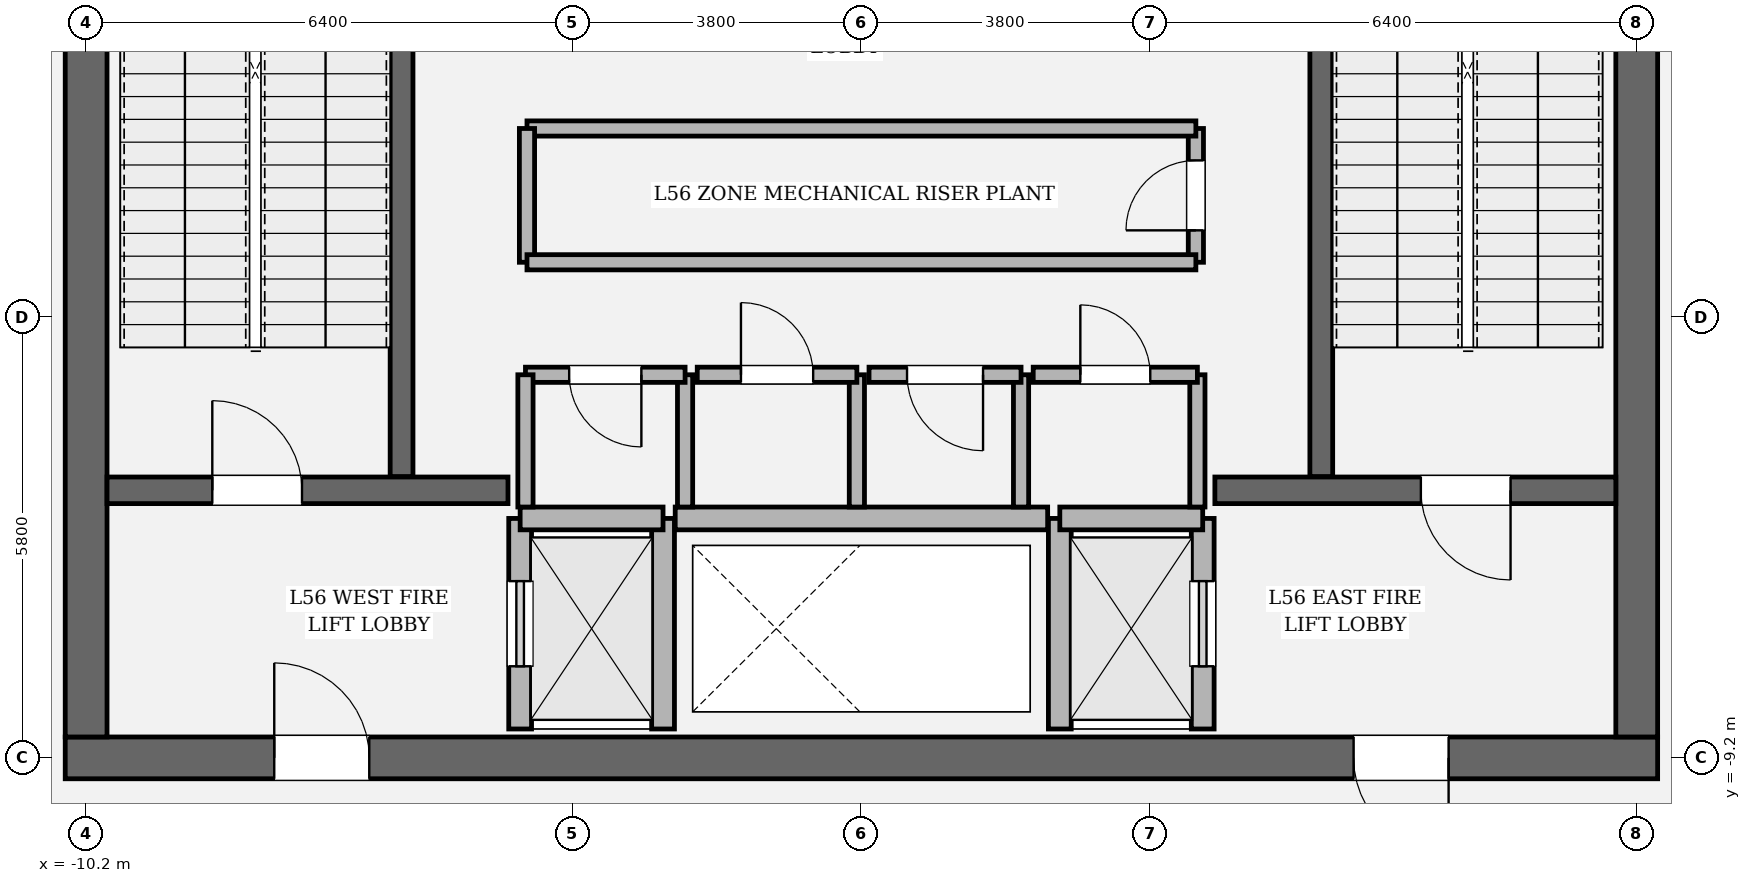
"""IFC4 building model, lengths in metres.
Left out: names, types, materials, properties, quantities, classifications, styles, units other than length and angle.
Written with IfcOpenShell. Run it as: python <this file> out.ifc"""

import sys

from ifc_helpers import new_model, si_unit, direction, frame, frame_2d, origin, place, context, subcontext, project, spatial, rectangle, extrude, element, fill, save


model = new_model("IFC4")
c1 = context("Model", 3, precision=1e-05, world=origin(), true_north=direction((0.0, 1.0)))
c2 = subcontext(c1, "Body", "Model", "MODEL_VIEW")
j1 = project(units=[si_unit("LENGTHUNIT", "METRE"), si_unit("PLANEANGLEUNIT", "RADIAN")], contexts=[c1])
p1 = place(None, origin())
s1 = spatial("IfcSite", under=j1, at=p1, CompositionType="ELEMENT")
p2 = place(p1, origin())
s2 = spatial("IfcBuilding", under=s1, at=p2, CompositionType="ELEMENT")
p3 = place(p2, frame((0.0, 0.0, 237.0)))
s3 = spatial("IfcBuildingStorey", under=s2, at=p3, CompositionType="ELEMENT", Elevation=237.0)
p4 = place(p3, frame((10.475, -9.2, 0.0), z_axis=(0.0, 0.0, 1.0), x_axis=(-1.0, 0.0, 0.0)))
e1 = element("IfcWall", 1, at=p4, inside=s3, PredefinedType="SHEAR", context=c2, shape_type="SweptSolid", body=[
    extrude(rectangle(XDim=20.95, YDim=0.55, at=frame_2d((10.475, 0.0))), origin(), (0.0, 0.0, 1.0), 4.8),
])
p5 = place(p4, frame((2.75, 0.0, 0.0)))
e2 = element("IfcOpeningElement", 2, at=p5, cuts=e1, PredefinedType="OPENING", context=c2, shape_type="SweptSolid", body=[
    extrude(rectangle(XDim=1.25, YDim=2.25, at=frame_2d((0.625, 1.125))), frame((0.0, 0.285, 0.0), z_axis=(0.0, -1.0, 0.0), x_axis=(1.0, 0.0, 0.0)), (0.0, 0.0, 1.0), 0.57),
])
p6 = place(p4, frame((16.95, 0.0, 0.0)))
e3 = element("IfcOpeningElement", 3, at=p6, cuts=e1, PredefinedType="OPENING", context=c2, shape_type="SweptSolid", body=[
    extrude(rectangle(XDim=1.25, YDim=2.25, at=frame_2d((0.625, 1.125))), frame((0.0, 0.285, 0.0), z_axis=(0.0, -1.0, 0.0), x_axis=(1.0, 0.0, 0.0)), (0.0, 0.0, 1.0), 0.57),
])
p7 = place(p3, frame((-10.2, -8.925, 0.0), z_axis=(0.0, 0.0, 1.0), x_axis=(0.0, 1.0, 0.0)))
e4 = element("IfcWall", 4, at=p7, inside=s3, PredefinedType="SHEAR", context=c2, shape_type="SweptSolid", body=[
    extrude(rectangle(XDim=17.85, YDim=0.55, at=frame_2d((8.925, 0.0))), origin(), (0.0, 0.0, 1.0), 4.8),
])
p8 = place(p7, frame((12.715, 0.0, 0.0)))
e5 = element("IfcOpeningElement", 5, at=p8, cuts=e4, PredefinedType="OPENING", context=c2, shape_type="SweptSolid", body=[
    extrude(rectangle(XDim=1.18, YDim=2.2, at=frame_2d((0.59, 1.1))), frame((0.0, 0.285, 0.0), z_axis=(0.0, -1.0, 0.0), x_axis=(1.0, 0.0, 0.0)), (0.0, 0.0, 1.0), 0.57),
])
p9 = place(p3, frame((10.2, 8.925, 0.0), z_axis=(0.0, 0.0, 1.0), x_axis=(0.0, -1.0, 0.0)))
e6 = element("IfcWall", 6, at=p9, inside=s3, PredefinedType="SHEAR", context=c2, shape_type="SweptSolid", body=[
    extrude(rectangle(XDim=17.85, YDim=0.55, at=frame_2d((8.925, 0.0))), origin(), (0.0, 0.0, 1.0), 4.8),
])
p10 = place(p9, frame((3.955, 0.0, 0.0)))
e7 = element("IfcOpeningElement", 7, at=p10, cuts=e6, PredefinedType="OPENING", context=c2, shape_type="SweptSolid", body=[
    extrude(rectangle(XDim=1.18, YDim=2.2, at=frame_2d((0.59, 1.1))), frame((0.0, 0.285, 0.0), z_axis=(0.0, -1.0, 0.0), x_axis=(1.0, 0.0, 0.0)), (0.0, 0.0, 1.0), 0.57),
])
for number, where, z_axis, x_axis in (
    (8, (-6.05, -5.5, 0.0), (0.0, 0.0, 1.0), (0.0, 1.0, 0.0)),
    (9, (6.05, 3.45, 0.0), (0.0, 0.0, 1.0), (0.0, -1.0, 0.0)),
):
    element("IfcWall", number, at=place(p3, frame(where, z_axis=z_axis, x_axis=x_axis)), inside=s3, PredefinedType="SOLIDWALL", context=c2, shape_type="SweptSolid", body=[
        extrude(rectangle(XDim=8.95, YDim=0.3, at=frame_2d((4.475, 0.0))), origin(), (0.0, 0.0, 1.0), 4.8),
    ])
p11 = place(p3, frame((-9.925, -5.68, 0.0), z_axis=(0.0, 0.0, 1.0), x_axis=(1.0, 0.0, 0.0)))
e10 = element("IfcWall", 10, at=p11, inside=s3, PredefinedType="SOLIDWALL", context=c2, shape_type="SweptSolid", body=[
    extrude(rectangle(XDim=5.275, YDim=0.35, at=frame_2d((2.638, 0.0))), origin(), (0.0, 0.0, 1.0), 4.8),
])
p12 = place(p11, frame((1.385, 0.0, 0.0)))
e11 = element("IfcOpeningElement", 11, at=p12, cuts=e10, PredefinedType="OPENING", context=c2, shape_type="SweptSolid", body=[
    extrude(rectangle(XDim=1.18, YDim=2.2, at=frame_2d((0.59, 1.1))), frame((0.0, 0.185, 0.0), z_axis=(0.0, -1.0, 0.0), x_axis=(1.0, 0.0, 0.0)), (0.0, 0.0, 1.0), 0.37),
])
p13 = place(p3, frame((4.65, -5.68, 0.0), z_axis=(0.0, 0.0, 1.0), x_axis=(1.0, 0.0, 0.0)))
e12 = element("IfcWall", 12, at=p13, inside=s3, PredefinedType="SOLIDWALL", context=c2, shape_type="SweptSolid", body=[
    extrude(rectangle(XDim=5.275, YDim=0.35, at=frame_2d((2.638, 0.0))), origin(), (0.0, 0.0, 1.0), 4.8),
])
p14 = place(p13, frame((2.71, 0.0, 0.0)))
e13 = element("IfcOpeningElement", 13, at=p14, cuts=e12, PredefinedType="OPENING", context=c2, shape_type="SweptSolid", body=[
    extrude(rectangle(XDim=1.18, YDim=2.2, at=frame_2d((0.59, 1.1))), frame((0.0, 0.185, 0.0), z_axis=(0.0, -1.0, 0.0), x_axis=(1.0, 0.0, 0.0)), (0.0, 0.0, 1.0), 0.37),
])
p15 = place(p3, frame((-4.49, -8.82, 0.0), z_axis=(0.0, 0.0, 1.0), x_axis=(0.0, 1.0, 0.0)))
e14 = element("IfcWall", 14, at=p15, inside=s3, PredefinedType="SOLIDWALL", context=c2, shape_type="SweptSolid", body=[
    extrude(rectangle(XDim=2.77, YDim=0.3, at=frame_2d((1.385, 0.0))), origin(), (0.0, 0.0, 1.0), 4.48),
])
p16 = place(p15, frame((0.825, 0.0, 0.0)))
e15 = element("IfcOpeningElement", 15, at=p16, cuts=e14, PredefinedType="OPENING", context=c2, shape_type="SweptSolid", body=[
    extrude(rectangle(XDim=1.12, YDim=2.25, at=frame_2d((0.56, 1.125))), frame((0.0, 0.16, 0.0), z_axis=(0.0, -1.0, 0.0), x_axis=(1.0, 0.0, 0.0)), (0.0, 0.0, 1.0), 0.32),
])
p17 = place(p3, frame((-2.61, -8.82, 0.0), z_axis=(0.0, 0.0, 1.0), x_axis=(0.0, 1.0, 0.0)))
e16 = element("IfcWall", 16, at=p17, inside=s3, PredefinedType="SOLIDWALL", context=c2, shape_type="SweptSolid", body=[
    extrude(rectangle(XDim=2.77, YDim=0.3, at=frame_2d((1.385, 0.0))), origin(), (0.0, 0.0, 1.0), 4.48),
])
p18 = place(p3, frame((-4.49, -6.05, 0.0), z_axis=(0.0, 0.0, 1.0), x_axis=(1.0, 0.0, 0.0)))
e17 = element("IfcWall", 17, at=p18, inside=s3, PredefinedType="SOLIDWALL", context=c2, shape_type="SweptSolid", body=[
    extrude(rectangle(XDim=1.88, YDim=0.3, at=frame_2d((0.94, 0.0))), origin(), (0.0, 0.0, 1.0), 4.48),
])
p19 = place(p3, frame((4.49, -8.82, 0.0), z_axis=(0.0, 0.0, 1.0), x_axis=(0.0, 1.0, 0.0)))
e18 = element("IfcWall", 18, at=p19, inside=s3, PredefinedType="SOLIDWALL", context=c2, shape_type="SweptSolid", body=[
    extrude(rectangle(XDim=2.77, YDim=0.3, at=frame_2d((1.385, 0.0))), origin(), (0.0, 0.0, 1.0), 4.48),
])
p20 = place(p19, frame((0.825, 0.0, 0.0)))
e19 = element("IfcOpeningElement", 19, at=p20, cuts=e18, PredefinedType="OPENING", context=c2, shape_type="SweptSolid", body=[
    extrude(rectangle(XDim=1.12, YDim=2.25, at=frame_2d((0.56, 1.125))), frame((0.0, 0.16, 0.0), z_axis=(0.0, -1.0, 0.0), x_axis=(1.0, 0.0, 0.0)), (0.0, 0.0, 1.0), 0.32),
])
p21 = place(p3, frame((2.61, -8.82, 0.0), z_axis=(0.0, 0.0, 1.0), x_axis=(0.0, 1.0, 0.0)))
e20 = element("IfcWall", 20, at=p21, inside=s3, PredefinedType="SOLIDWALL", context=c2, shape_type="SweptSolid", body=[
    extrude(rectangle(XDim=2.77, YDim=0.3, at=frame_2d((1.385, 0.0))), origin(), (0.0, 0.0, 1.0), 4.48),
])
p22 = place(p3, frame((2.61, -6.05, 0.0), z_axis=(0.0, 0.0, 1.0), x_axis=(1.0, 0.0, 0.0)))
e21 = element("IfcWall", 21, at=p22, inside=s3, PredefinedType="SOLIDWALL", context=c2, shape_type="SweptSolid", body=[
    extrude(rectangle(XDim=1.88, YDim=0.3, at=frame_2d((0.94, 0.0))), origin(), (0.0, 0.0, 1.0), 4.48),
])
p23 = place(p3, frame((-2.45, -6.05, 0.0), z_axis=(0.0, 0.0, 1.0), x_axis=(1.0, 0.0, 0.0)))
e22 = element("IfcWall", 22, at=p23, inside=s3, PredefinedType="SOLIDWALL", context=c2, shape_type="SweptSolid", body=[
    extrude(rectangle(XDim=4.9, YDim=0.3, at=frame_2d((2.45, 0.0))), origin(), (0.0, 0.0, 1.0), 4.48),
])
p24 = place(p3, frame((-2.32, -5.9, 0.0), z_axis=(0.0, 0.0, 1.0), x_axis=(0.0, 1.0, 0.0)))
e23 = element("IfcWall", 23, at=p24, inside=s3, PredefinedType="SOLIDWALL", context=c2, shape_type="SweptSolid", body=[
    extrude(rectangle(XDim=1.74, YDim=0.2, at=frame_2d((0.87, 0.0))), origin(), (0.0, 0.0, 1.0), 4.48),
])
p25 = place(p3, frame((-2.32, -4.16, 0.0), z_axis=(0.0, 0.0, 1.0), x_axis=(-1.0, 0.0, 0.0)))
e24 = element("IfcWall", 24, at=p25, inside=s3, PredefinedType="SOLIDWALL", context=c2, shape_type="SweptSolid", body=[
    extrude(rectangle(XDim=2.1, YDim=0.2, at=frame_2d((1.05, 0.0))), origin(), (0.0, 0.0, 1.0), 4.48),
])
p26 = place(p25, frame((0.575, 0.0, 0.0)))
e25 = element("IfcOpeningElement", 25, at=p26, cuts=e24, PredefinedType="OPENING", context=c2, shape_type="SweptSolid", body=[
    extrude(rectangle(XDim=0.95, YDim=2.15, at=frame_2d((0.475, 1.075))), frame((0.0, 0.11, 0.0), z_axis=(0.0, -1.0, 0.0), x_axis=(1.0, 0.0, 0.0)), (0.0, 0.0, 1.0), 0.22),
])
for number, where, z_axis, x_axis in (
    (26, (-4.42, -4.16, 0.0), (0.0, 0.0, 1.0), (0.0, -1.0, 0.0)),
    (27, (-0.06, -5.9, 0.0), (0.0, 0.0, 1.0), (0.0, 1.0, 0.0)),
):
    element("IfcWall", number, at=place(p3, frame(where, z_axis=z_axis, x_axis=x_axis)), inside=s3, PredefinedType="SOLIDWALL", context=c2, shape_type="SweptSolid", body=[
        extrude(rectangle(XDim=1.74, YDim=0.2, at=frame_2d((0.87, 0.0))), origin(), (0.0, 0.0, 1.0), 4.48),
    ])
p27 = place(p3, frame((-0.06, -4.16, 0.0), z_axis=(0.0, 0.0, 1.0), x_axis=(-1.0, 0.0, 0.0)))
e28 = element("IfcWall", 28, at=p27, inside=s3, PredefinedType="SOLIDWALL", context=c2, shape_type="SweptSolid", body=[
    extrude(rectangle(XDim=2.1, YDim=0.2, at=frame_2d((1.05, 0.0))), origin(), (0.0, 0.0, 1.0), 4.48),
])
p28 = place(p27, frame((0.575, 0.0, 0.0)))
e29 = element("IfcOpeningElement", 29, at=p28, cuts=e28, PredefinedType="OPENING", context=c2, shape_type="SweptSolid", body=[
    extrude(rectangle(XDim=0.95, YDim=2.15, at=frame_2d((0.475, 1.075))), frame((0.0, 0.11, 0.0), z_axis=(0.0, -1.0, 0.0), x_axis=(1.0, 0.0, 0.0)), (0.0, 0.0, 1.0), 0.22),
])
p29 = place(p3, frame((2.1, -5.9, 0.0), z_axis=(0.0, 0.0, 1.0), x_axis=(0.0, 1.0, 0.0)))
e30 = element("IfcWall", 30, at=p29, inside=s3, PredefinedType="SOLIDWALL", context=c2, shape_type="SweptSolid", body=[
    extrude(rectangle(XDim=1.74, YDim=0.2, at=frame_2d((0.87, 0.0))), origin(), (0.0, 0.0, 1.0), 4.48),
])
p30 = place(p3, frame((2.1, -4.16, 0.0), z_axis=(0.0, 0.0, 1.0), x_axis=(-1.0, 0.0, 0.0)))
e31 = element("IfcWall", 31, at=p30, inside=s3, PredefinedType="SOLIDWALL", context=c2, shape_type="SweptSolid", body=[
    extrude(rectangle(XDim=2.0, YDim=0.2, at=frame_2d((1.0, 0.0))), origin(), (0.0, 0.0, 1.0), 4.48),
])
p31 = place(p30, frame((0.5, 0.0, 0.0)))
e32 = element("IfcOpeningElement", 32, at=p31, cuts=e31, PredefinedType="OPENING", context=c2, shape_type="SweptSolid", body=[
    extrude(rectangle(XDim=1.0, YDim=2.15, at=frame_2d((0.5, 1.075))), frame((0.0, 0.11, 0.0), z_axis=(0.0, -1.0, 0.0), x_axis=(1.0, 0.0, 0.0)), (0.0, 0.0, 1.0), 0.22),
])
p32 = place(p3, frame((4.42, -5.9, 0.0), z_axis=(0.0, 0.0, 1.0), x_axis=(0.0, 1.0, 0.0)))
e33 = element("IfcWall", 33, at=p32, inside=s3, PredefinedType="SOLIDWALL", context=c2, shape_type="SweptSolid", body=[
    extrude(rectangle(XDim=1.74, YDim=0.2, at=frame_2d((0.87, 0.0))), origin(), (0.0, 0.0, 1.0), 4.48),
])
p33 = place(p3, frame((4.42, -4.16, 0.0), z_axis=(0.0, 0.0, 1.0), x_axis=(-1.0, 0.0, 0.0)))
e34 = element("IfcWall", 34, at=p33, inside=s3, PredefinedType="SOLIDWALL", context=c2, shape_type="SweptSolid", body=[
    extrude(rectangle(XDim=2.16, YDim=0.2, at=frame_2d((1.08, 0.0))), origin(), (0.0, 0.0, 1.0), 4.48),
])
p34 = place(p33, frame((0.62, 0.0, 0.0)))
e35 = element("IfcOpeningElement", 35, at=p34, cuts=e34, PredefinedType="OPENING", context=c2, shape_type="SweptSolid", body=[
    extrude(rectangle(XDim=0.92, YDim=2.1, at=frame_2d((0.46, 1.05))), frame((0.0, 0.11, 0.0), z_axis=(0.0, -1.0, 0.0), x_axis=(1.0, 0.0, 0.0)), (0.0, 0.0, 1.0), 0.22),
])
p35 = place(p3, frame((4.4, -2.68, 0.0), z_axis=(0.0, 0.0, 1.0), x_axis=(0.0, 1.0, 0.0)))
e36 = element("IfcWall", 36, at=p35, inside=s3, PredefinedType="SOLIDWALL", context=c2, shape_type="SweptSolid", body=[
    extrude(rectangle(XDim=1.76, YDim=0.2, at=frame_2d((0.88, 0.0))), origin(), (0.0, 0.0, 1.0), 4.48),
])
p36 = place(p35, frame((0.42, 0.0, 0.0)))
e37 = element("IfcOpeningElement", 37, at=p36, cuts=e36, PredefinedType="OPENING", context=c2, shape_type="SweptSolid", body=[
    extrude(rectangle(XDim=0.92, YDim=2.1, at=frame_2d((0.46, 1.05))), frame((0.0, 0.11, 0.0), z_axis=(0.0, -1.0, 0.0), x_axis=(1.0, 0.0, 0.0)), (0.0, 0.0, 1.0), 0.22),
])
p37 = place(p3, frame((4.4, -0.92, 0.0), z_axis=(0.0, 0.0, 1.0), x_axis=(-1.0, 0.0, 0.0)))
e38 = element("IfcWall", 38, at=p37, inside=s3, PredefinedType="SOLIDWALL", context=c2, shape_type="SweptSolid", body=[
    extrude(rectangle(XDim=8.8, YDim=0.2, at=frame_2d((4.4, 0.0))), origin(), (0.0, 0.0, 1.0), 4.48),
])
p38 = place(p3, frame((-4.4, -0.92, 0.0), z_axis=(0.0, 0.0, 1.0), x_axis=(0.0, -1.0, 0.0)))
e39 = element("IfcWall", 39, at=p38, inside=s3, PredefinedType="SOLIDWALL", context=c2, shape_type="SweptSolid", body=[
    extrude(rectangle(XDim=1.76, YDim=0.2, at=frame_2d((0.88, 0.0))), origin(), (0.0, 0.0, 1.0), 4.48),
])
p39 = place(p3, frame((-4.4, -2.68, 0.0), z_axis=(0.0, 0.0, 1.0), x_axis=(1.0, 0.0, 0.0)))
e40 = element("IfcWall", 40, at=p39, inside=s3, PredefinedType="SOLIDWALL", context=c2, shape_type="SweptSolid", body=[
    extrude(rectangle(XDim=8.8, YDim=0.2, at=frame_2d((4.4, 0.0))), origin(), (0.0, 0.0, 1.0), 4.48),
])
p40 = place(p12, origin())
e41 = element("IfcDoor", 41, at=p40, inside=s3, OperationType="SINGLE_SWING_LEFT", PredefinedType="DOOR", context=c2, shape_type="SweptSolid", body=[
    extrude(rectangle(XDim=1.18, YDim=2.2, at=frame_2d((0.59, 1.1))), frame((0.0, 0.025, 0.0), z_axis=(0.0, -1.0, 0.0), x_axis=(1.0, 0.0, 0.0)), (0.0, 0.0, 1.0), 0.05),
])
fill(e11, e41)
p41 = place(p14, origin())
e42 = element("IfcDoor", 42, at=p41, inside=s3, OperationType="SINGLE_SWING_RIGHT", PredefinedType="DOOR", context=c2, shape_type="SweptSolid", body=[
    extrude(rectangle(XDim=1.18, YDim=2.2, at=frame_2d((0.59, 1.1))), frame((0.0, 0.025, 0.0), z_axis=(0.0, -1.0, 0.0), x_axis=(1.0, 0.0, 0.0)), (0.0, 0.0, 1.0), 0.05),
])
fill(e13, e42)
p42 = place(p5, origin())
e43 = element("IfcDoor", 43, at=p42, inside=s3, OperationType="SINGLE_SWING_LEFT", PredefinedType="DOOR", context=c2, shape_type="SweptSolid", body=[
    extrude(rectangle(XDim=1.25, YDim=2.25, at=frame_2d((0.625, 1.125))), frame((0.0, 0.025, 0.0), z_axis=(0.0, -1.0, 0.0), x_axis=(1.0, 0.0, 0.0)), (0.0, 0.0, 1.0), 0.05),
])
fill(e2, e43)
p43 = place(p6, origin())
e44 = element("IfcDoor", 44, at=p43, inside=s3, OperationType="SINGLE_SWING_RIGHT", PredefinedType="DOOR", context=c2, shape_type="SweptSolid", body=[
    extrude(rectangle(XDim=1.25, YDim=2.25, at=frame_2d((0.625, 1.125))), frame((0.0, 0.025, 0.0), z_axis=(0.0, -1.0, 0.0), x_axis=(1.0, 0.0, 0.0)), (0.0, 0.0, 1.0), 0.05),
])
fill(e3, e44)
p44 = place(p16, origin())
e45 = element("IfcDoor", 45, at=p44, inside=s3, OperationType="SLIDING_TO_LEFT", PredefinedType="DOOR", context=c2, shape_type="SweptSolid", body=[
    extrude(rectangle(XDim=1.12, YDim=2.25, at=frame_2d((0.56, 1.125))), frame((0.0, 0.025, 0.0), z_axis=(0.0, -1.0, 0.0), x_axis=(1.0, 0.0, 0.0)), (0.0, 0.0, 1.0), 0.05),
])
fill(e15, e45)
p45 = place(p20, origin())
e46 = element("IfcDoor", 46, at=p45, inside=s3, OperationType="SLIDING_TO_RIGHT", PredefinedType="DOOR", context=c2, shape_type="SweptSolid", body=[
    extrude(rectangle(XDim=1.12, YDim=2.25, at=frame_2d((0.56, 1.125))), frame((0.0, 0.025, 0.0), z_axis=(0.0, -1.0, 0.0), x_axis=(1.0, 0.0, 0.0)), (0.0, 0.0, 1.0), 0.05),
])
fill(e19, e46)
p46 = place(p26, origin())
e47 = element("IfcDoor", 47, at=p46, inside=s3, OperationType="SINGLE_SWING_LEFT", PredefinedType="DOOR", context=c2, shape_type="SweptSolid", body=[
    extrude(rectangle(XDim=0.95, YDim=2.15, at=frame_2d((0.475, 1.075))), frame((0.0, 0.025, 0.0), z_axis=(0.0, -1.0, 0.0), x_axis=(1.0, 0.0, 0.0)), (0.0, 0.0, 1.0), 0.05),
])
fill(e25, e47)
p47 = place(p28, origin())
e48 = element("IfcDoor", 48, at=p47, inside=s3, OperationType="SINGLE_SWING_RIGHT", PredefinedType="DOOR", context=c2, shape_type="SweptSolid", body=[
    extrude(rectangle(XDim=0.95, YDim=2.15, at=frame_2d((0.475, 1.075))), frame((0.0, 0.025, 0.0), z_axis=(0.0, -1.0, 0.0), x_axis=(1.0, 0.0, 0.0)), (0.0, 0.0, 1.0), 0.05),
])
fill(e29, e48)
p48 = place(p31, origin())
e49 = element("IfcDoor", 49, at=p48, inside=s3, OperationType="SINGLE_SWING_LEFT", PredefinedType="DOOR", context=c2, shape_type="SweptSolid", body=[
    extrude(rectangle(XDim=1.0, YDim=2.15, at=frame_2d((0.5, 1.075))), frame((0.0, 0.025, 0.0), z_axis=(0.0, -1.0, 0.0), x_axis=(1.0, 0.0, 0.0)), (0.0, 0.0, 1.0), 0.05),
])
fill(e32, e49)
p49 = place(p34, origin())
e50 = element("IfcDoor", 50, at=p49, inside=s3, OperationType="SINGLE_SWING_RIGHT", PredefinedType="DOOR", context=c2, shape_type="SweptSolid", body=[
    extrude(rectangle(XDim=0.92, YDim=2.1, at=frame_2d((0.46, 1.05))), frame((0.0, 0.025, 0.0), z_axis=(0.0, -1.0, 0.0), x_axis=(1.0, 0.0, 0.0)), (0.0, 0.0, 1.0), 0.05),
])
fill(e35, e50)
p50 = place(p36, origin())
e51 = element("IfcDoor", 51, at=p50, inside=s3, OperationType="SINGLE_SWING_LEFT", PredefinedType="DOOR", context=c2, shape_type="SweptSolid", body=[
    extrude(rectangle(XDim=0.92, YDim=2.1, at=frame_2d((0.46, 1.05))), frame((0.0, 0.025, 0.0), z_axis=(0.0, -1.0, 0.0), x_axis=(1.0, 0.0, 0.0)), (0.0, 0.0, 1.0), 0.05),
])
fill(e37, e51)
save(model, sys.argv[1])
